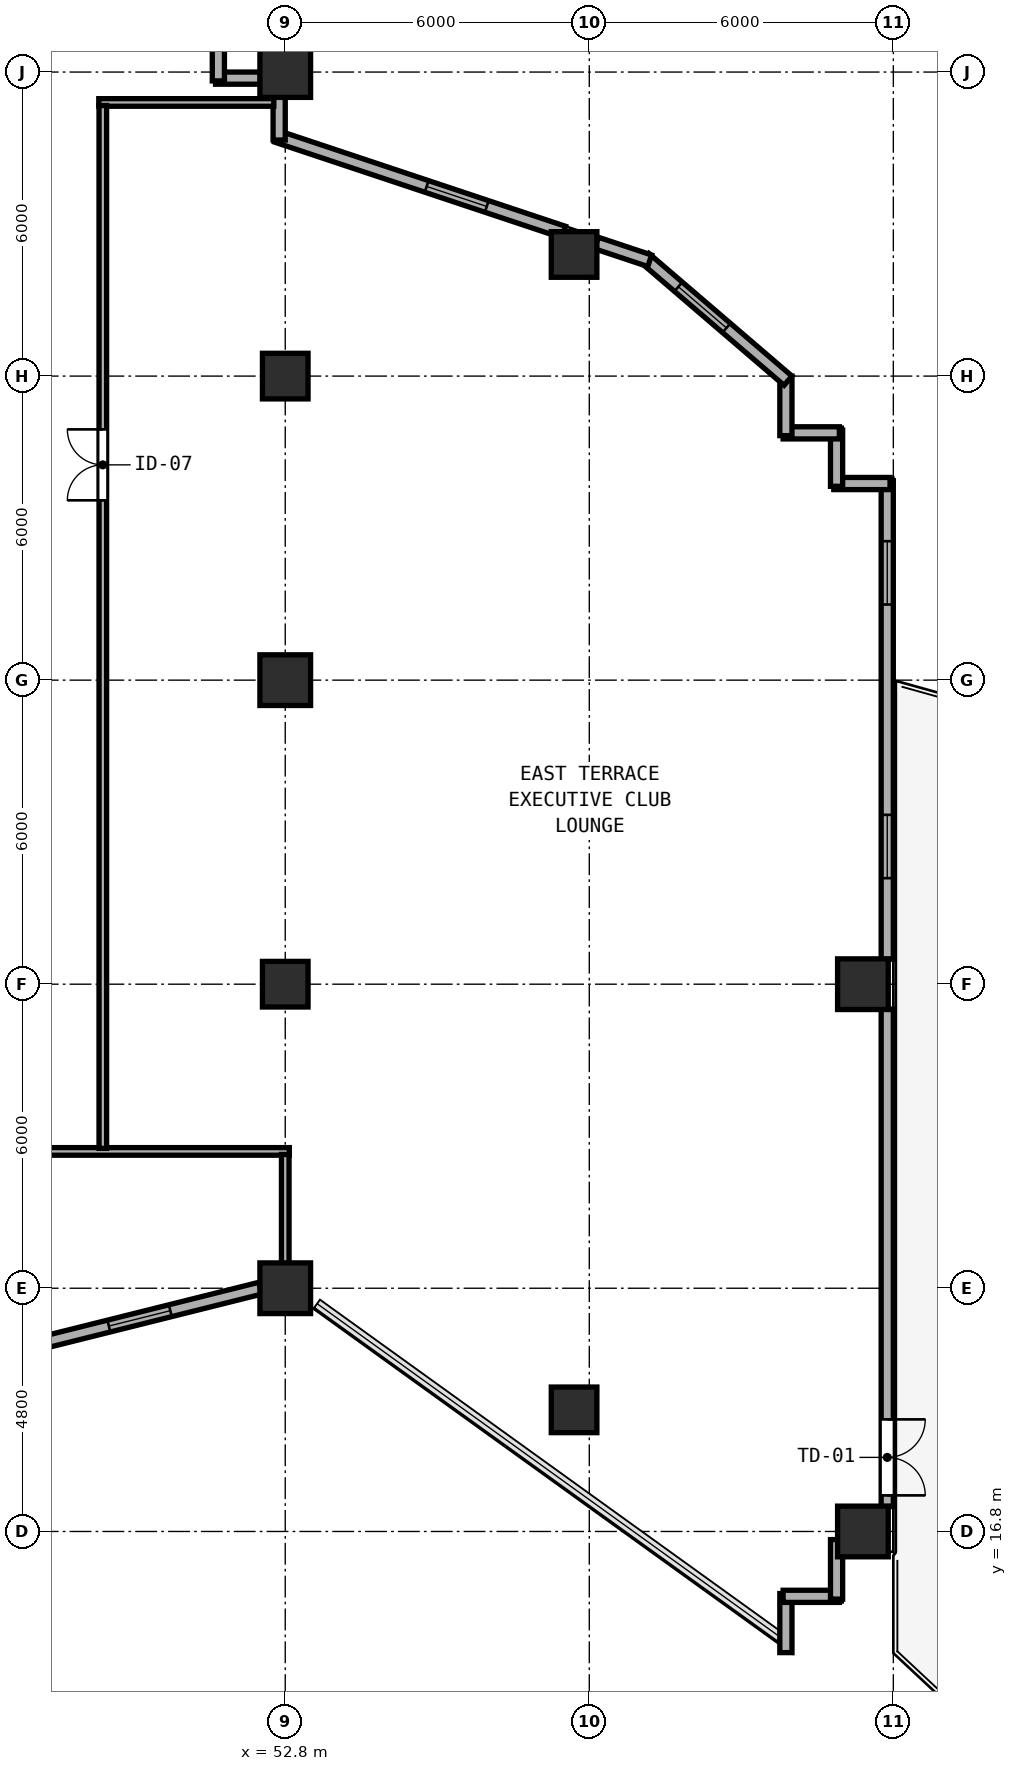
"""IFC4 building model, lengths in metres.
Left out: names, types, materials, properties, quantities, classifications, styles, units other than length and angle.
Written with IfcOpenShell. Run it as: python <this file> out.ifc"""

import sys

from ifc_helpers import new_model, si_unit, direction, frame, frame_2d, origin, origin_2d, place, context, subcontext, project, spatial, rectangle, hollow_rectangle, extrude, element, fill, save


model = new_model("IFC4")
c1 = context("Model", 3, precision=1e-05, world=origin(), true_north=direction((0.0, 1.0)))
c2 = subcontext(c1, "Body", "Model", "MODEL_VIEW")
j1 = project(units=[si_unit("LENGTHUNIT", "METRE"), si_unit("PLANEANGLEUNIT", "RADIAN")], contexts=[c1])
p1 = place(None, origin())
s1 = spatial("IfcSite", under=j1, at=p1, CompositionType="ELEMENT")
p2 = place(p1, origin())
s2 = spatial("IfcBuilding", under=s1, at=p2, CompositionType="ELEMENT")
p3 = place(p2, frame((0.0, 0.0, 94.0)))
s3 = spatial("IfcBuildingStorey", under=s2, at=p3, CompositionType="ELEMENT", Elevation=94.0)
for number, where, z_axis, x_axis in (
    (1, (52.8, 21.6, 0.0), (0.0, 0.0, 1.0), (1.0, 0.0, 0.0)),
    (2, (52.8, 33.6, 0.0), (0.0, 0.0, 1.0), (1.0, 0.0, 0.0)),
    (3, (52.8, 45.6, 0.0), (0.0, 0.0, 1.0), (1.0, 0.0, 0.0)),
    (4, (64.2, 16.8, 0.0), (0.0, 0.0, 1.0), (1.0, 0.0, 0.0)),
    (5, (64.2, 27.6, 0.0), (0.0, 0.0, 1.0), (1.0, 0.0, 0.0)),
):
    element("IfcColumn", number, at=place(p3, frame(where, z_axis=z_axis, x_axis=x_axis)), inside=s3, PredefinedType="COLUMN", context=c2, shape_type="SweptSolid", body=[
        extrude(hollow_rectangle(XDim=1.0, YDim=1.0, WallThickness=0.038, at=origin_2d()), origin(), (0.0, 0.0, 1.0), 4.4),
    ])
for number, where, z_axis, x_axis in (
    (6, (52.8, 27.6, 0.0), (0.0, 0.0, 1.0), (1.0, 0.0, 0.0)),
    (7, (52.8, 39.6, 0.0), (0.0, 0.0, 1.0), (1.0, 0.0, 0.0)),
    (8, (58.5, 19.2, 0.0), (0.0, 0.0, 1.0), (1.0, 0.0, 0.0)),
    (9, (58.5, 42.0, 0.0), (0.0, 0.0, 1.0), (1.0, 0.0, 0.0)),
):
    element("IfcColumn", number, at=place(p3, frame(where, z_axis=z_axis, x_axis=x_axis)), inside=s3, PredefinedType="COLUMN", context=c2, shape_type="SweptSolid", body=[
        extrude(hollow_rectangle(XDim=0.9, YDim=0.9, WallThickness=0.034, at=origin_2d()), origin(), (0.0, 0.0, 1.0), 4.4),
    ])
p4 = place(p3, frame((47.767, 20.465, 0.0), z_axis=(0.0, 0.0, 1.0), x_axis=(0.970145568042, 0.242523353121, 0.0)))
e10 = element("IfcWall", 10, at=p4, inside=s3, PredefinedType="SOLIDWALL", context=c2, shape_type="SweptSolid", body=[
    extrude(rectangle(XDim=4.681, YDim=0.24, at=frame_2d((2.34, 0.0))), origin(), (0.0, 0.0, 1.0), 3.745),
])
p5 = place(p4, frame((1.6, 0.0, 0.85)))
e11 = element("IfcOpeningElement", 11, at=p5, cuts=e10, PredefinedType="OPENING", context=c2, shape_type="SweptSolid", body=[
    extrude(rectangle(XDim=1.25, YDim=1.95, at=frame_2d((0.625, 0.975))), frame((0.0, 0.13, 0.0), z_axis=(0.0, -1.0, 0.0), x_axis=(1.0, 0.0, 0.0)), (0.0, 0.0, 1.0), 0.26),
])
p6 = place(p3, frame((62.68, 14.409, 0.0), z_axis=(0.0, 0.0, 1.0), x_axis=(0.0, 1.0, 0.0)))
e12 = element("IfcWall", 12, at=p6, inside=s3, PredefinedType="SOLIDWALL", context=c2, shape_type="SweptSolid", body=[
    extrude(rectangle(XDim=1.166, YDim=0.24, at=frame_2d((0.583, 0.0))), origin(), (0.0, 0.0, 1.0), 4.2),
])
p7 = place(p3, frame((62.625, 15.52, 0.0), z_axis=(0.0, 0.0, 1.0), x_axis=(1.0, 0.0, 0.0)))
e13 = element("IfcWall", 13, at=p7, inside=s3, PredefinedType="SOLIDWALL", context=c2, shape_type="SweptSolid", body=[
    extrude(rectangle(XDim=1.11, YDim=0.24, at=frame_2d((0.555, 0.0))), origin(), (0.0, 0.0, 1.0), 4.2),
])
p8 = place(p3, frame((63.68, 15.465, 0.0), z_axis=(0.0, 0.0, 1.0), x_axis=(0.0, 1.0, 0.0)))
e14 = element("IfcWall", 14, at=p8, inside=s3, PredefinedType="SOLIDWALL", context=c2, shape_type="SweptSolid", body=[
    extrude(rectangle(XDim=1.175, YDim=0.24, at=frame_2d((0.587, 0.0))), origin(), (0.0, 0.0, 1.0), 4.2),
])
p9 = place(p3, frame((64.68, 17.292, 0.0), z_axis=(0.0, 0.0, 1.0), x_axis=(0.0, 1.0, 0.0)))
e15 = element("IfcWall", 15, at=p9, inside=s3, PredefinedType="SOLIDWALL", context=c2, shape_type="SweptSolid", body=[
    extrude(rectangle(XDim=9.816, YDim=0.24, at=frame_2d((4.908, 0.0))), origin(), (0.0, 0.0, 1.0), 4.2),
])
p10 = place(p9, frame((1.72, 0.0, 0.0), z_axis=(0.0, 0.0, 1.0), x_axis=(-1.0, 0.0, 0.0)))
e16 = element("IfcOpeningElement", 16, at=p10, cuts=e15, PredefinedType="OPENING", context=c2, shape_type="SweptSolid", body=[
    extrude(rectangle(XDim=1.5, YDim=2.2, at=frame_2d((0.75, 1.1))), frame((0.0, 0.13, 0.0), z_axis=(0.0, -1.0, 0.0), x_axis=(1.0, 0.0, 0.0)), (0.0, 0.0, 1.0), 0.26),
])
p11 = place(p3, frame((64.68, 28.092, 0.0), z_axis=(0.0, 0.0, 1.0), x_axis=(0.0, 1.0, 0.0)))
e17 = element("IfcWall", 17, at=p11, inside=s3, PredefinedType="SOLIDWALL", context=c2, shape_type="SweptSolid", body=[
    extrude(rectangle(XDim=9.443, YDim=0.24, at=frame_2d((4.721, 0.0))), origin(), (0.0, 0.0, 1.0), 4.2),
])
p12 = place(p11, frame((1.6, 0.0, 0.85)))
e18 = element("IfcOpeningElement", 18, at=p12, cuts=e17, PredefinedType="OPENING", context=c2, shape_type="SweptSolid", body=[
    extrude(rectangle(XDim=1.25, YDim=1.95, at=frame_2d((0.625, 0.975))), frame((0.0, 0.13, 0.0), z_axis=(0.0, -1.0, 0.0), x_axis=(1.0, 0.0, 0.0)), (0.0, 0.0, 1.0), 0.26),
])
p13 = place(p11, frame((7.0, 0.0, 0.85)))
e19 = element("IfcOpeningElement", 19, at=p13, cuts=e17, PredefinedType="OPENING", context=c2, shape_type="SweptSolid", body=[
    extrude(rectangle(XDim=1.25, YDim=1.95, at=frame_2d((0.625, 0.975))), frame((0.0, 0.13, 0.0), z_axis=(0.0, -1.0, 0.0), x_axis=(1.0, 0.0, 0.0)), (0.0, 0.0, 1.0), 0.26),
])
p14 = place(p3, frame((64.735, 37.48, 0.0), z_axis=(0.0, 0.0, 1.0), x_axis=(-1.0, 0.0, 0.0)))
e20 = element("IfcWall", 20, at=p14, inside=s3, PredefinedType="SOLIDWALL", context=c2, shape_type="SweptSolid", body=[
    extrude(rectangle(XDim=1.11, YDim=0.24, at=frame_2d((0.555, 0.0))), origin(), (0.0, 0.0, 1.0), 4.2),
])
p15 = place(p3, frame((63.68, 37.425, 0.0), z_axis=(0.0, 0.0, 1.0), x_axis=(0.0, 1.0, 0.0)))
e21 = element("IfcWall", 21, at=p15, inside=s3, PredefinedType="SOLIDWALL", context=c2, shape_type="SweptSolid", body=[
    extrude(rectangle(XDim=1.11, YDim=0.24, at=frame_2d((0.555, 0.0))), origin(), (0.0, 0.0, 1.0), 4.2),
])
p16 = place(p3, frame((63.735, 38.48, 0.0), z_axis=(0.0, 0.0, 1.0), x_axis=(-1.0, 0.0, 0.0)))
e22 = element("IfcWall", 22, at=p16, inside=s3, PredefinedType="SOLIDWALL", context=c2, shape_type="SweptSolid", body=[
    extrude(rectangle(XDim=1.11, YDim=0.24, at=frame_2d((0.555, 0.0))), origin(), (0.0, 0.0, 1.0), 4.2),
])
p17 = place(p3, frame((62.68, 38.425, 0.0), z_axis=(0.0, 0.0, 1.0), x_axis=(0.0, 1.0, 0.0)))
e23 = element("IfcWall", 23, at=p17, inside=s3, PredefinedType="SOLIDWALL", context=c2, shape_type="SweptSolid", body=[
    extrude(rectangle(XDim=1.175, YDim=0.24, at=frame_2d((0.587, 0.0))), origin(), (0.0, 0.0, 1.0), 4.2),
])
p18 = place(p3, frame((62.722, 39.509, 0.0), z_axis=(0.0, 0.0, 1.0), x_axis=(-0.759247334792, 0.650802185469, 0.0)))
e24 = element("IfcWall", 24, at=p18, inside=s3, PredefinedType="SOLIDWALL", context=c2, shape_type="SweptSolid", body=[
    extrude(rectangle(XDim=3.719, YDim=0.24, at=frame_2d((1.86, 0.0))), origin(), (0.0, 0.0, 1.0), 4.2),
])
p19 = place(p18, frame((1.6, 0.0, 0.85)))
e25 = element("IfcOpeningElement", 25, at=p19, cuts=e24, PredefinedType="OPENING", context=c2, shape_type="SweptSolid", body=[
    extrude(rectangle(XDim=1.25, YDim=1.95, at=frame_2d((0.625, 0.975))), frame((0.0, 0.13, 0.0), z_axis=(0.0, -1.0, 0.0), x_axis=(1.0, 0.0, 0.0)), (0.0, 0.0, 1.0), 0.26),
])
p20 = place(p3, frame((59.992, 41.876, 0.0), z_axis=(0.0, 0.0, 1.0), x_axis=(-0.948661238983, 0.316293935527, 0.0)))
e26 = element("IfcWall", 26, at=p20, inside=s3, PredefinedType="SOLIDWALL", context=c2, shape_type="SweptSolid", body=[
    extrude(rectangle(XDim=1.107, YDim=0.24, at=frame_2d((0.553, 0.0))), origin(), (0.0, 0.0, 1.0), 4.2),
])
p21 = place(p3, frame((58.295, 42.442, 0.0), z_axis=(0.0, 0.0, 1.0), x_axis=(-0.948687385027, 0.316215504823, 0.0)))
e27 = element("IfcWall", 27, at=p21, inside=s3, PredefinedType="SOLIDWALL", context=c2, shape_type="SweptSolid", body=[
    extrude(rectangle(XDim=5.973, YDim=0.24, at=frame_2d((2.987, 0.0))), origin(), (0.0, 0.0, 1.0), 3.745),
])
p22 = place(p21, frame((1.6, 0.0, 0.85)))
e28 = element("IfcOpeningElement", 28, at=p22, cuts=e27, PredefinedType="OPENING", context=c2, shape_type="SweptSolid", body=[
    extrude(rectangle(XDim=1.25, YDim=1.95, at=frame_2d((0.625, 0.975))), frame((0.0, 0.13, 0.0), z_axis=(0.0, -1.0, 0.0), x_axis=(1.0, 0.0, 0.0)), (0.0, 0.0, 1.0), 0.26),
])
p23 = place(p3, frame((52.68, 44.259, 0.0), z_axis=(0.0, 0.0, 1.0), x_axis=(0.0, 1.0, 0.0)))
e29 = element("IfcWall", 29, at=p23, inside=s3, PredefinedType="SOLIDWALL", context=c2, shape_type="SweptSolid", body=[
    extrude(rectangle(XDim=0.849, YDim=0.24, at=frame_2d((0.425, 0.0))), origin(), (0.0, 0.0, 1.0), 3.745),
])
p24 = place(p3, frame((52.308, 45.48, 0.0), z_axis=(0.0, 0.0, 1.0), x_axis=(-1.0, 0.0, 0.0)))
e30 = element("IfcWall", 30, at=p24, inside=s3, PredefinedType="SOLIDWALL", context=c2, shape_type="SweptSolid", body=[
    extrude(rectangle(XDim=0.883, YDim=0.24, at=frame_2d((0.441, 0.0))), origin(), (0.0, 0.0, 1.0), 4.2),
])
p25 = place(p3, frame((51.48, 45.425, 0.0), z_axis=(0.0, 0.0, 1.0), x_axis=(0.0, 1.0, 0.0)))
e31 = element("IfcWall", 31, at=p25, inside=s3, PredefinedType="SOLIDWALL", context=c2, shape_type="SweptSolid", body=[
    extrude(rectangle(XDim=1.31, YDim=0.24, at=frame_2d((0.655, 0.0))), origin(), (0.0, 0.0, 1.0), 4.2),
])
p26 = place(p3, frame((23.92, 24.3, 0.0), z_axis=(0.0, 0.0, 1.0), x_axis=(1.0, 0.0, 0.0)))
e32 = element("IfcWall", 32, at=p26, inside=s3, PredefinedType="PARTITIONING", context=c2, shape_type="SweptSolid", body=[
    extrude(rectangle(XDim=28.96, YDim=0.15, at=frame_2d((14.48, 0.0))), origin(), (0.0, 0.0, 1.0), 4.2),
])
p27 = place(p26, frame((7.9, 0.0, 0.0), z_axis=(0.0, 0.0, 1.0), x_axis=(-1.0, 0.0, 0.0)))
e33 = element("IfcOpeningElement", 33, at=p27, cuts=e32, PredefinedType="OPENING", context=c2, shape_type="SweptSolid", body=[
    extrude(rectangle(XDim=1.4, YDim=2.18, at=frame_2d((0.7, 1.09))), frame((0.0, 0.085, 0.0), z_axis=(0.0, -1.0, 0.0), x_axis=(1.0, 0.0, 0.0)), (0.0, 0.0, 1.0), 0.17),
])
p28 = place(p3, frame((52.8, 21.819, 0.0), z_axis=(0.0, 0.0, 1.0), x_axis=(0.0, 1.0, 0.0)))
e34 = element("IfcWall", 34, at=p28, inside=s3, PredefinedType="PARTITIONING", context=c2, shape_type="SweptSolid", body=[
    extrude(rectangle(XDim=2.421, YDim=0.15, at=frame_2d((1.211, 0.0))), origin(), (0.0, 0.0, 1.0), 3.745),
])
p29 = place(p3, frame((49.12, 45.0, 0.0), z_axis=(0.0, 0.0, 1.0), x_axis=(1.0, 0.0, 0.0)))
e35 = element("IfcWall", 35, at=p29, inside=s3, PredefinedType="PARTITIONING", context=c2, shape_type="SweptSolid", body=[
    extrude(rectangle(XDim=3.455, YDim=0.15, at=frame_2d((1.728, 0.0))), origin(), (0.0, 0.0, 1.0), 4.2),
])
p30 = place(p3, frame((49.2, 24.36, 0.0), z_axis=(0.0, 0.0, 1.0), x_axis=(0.0, 1.0, 0.0)))
e36 = element("IfcWall", 36, at=p30, inside=s3, PredefinedType="PARTITIONING", context=c2, shape_type="SweptSolid", body=[
    extrude(rectangle(XDim=20.58, YDim=0.15, at=frame_2d((10.29, 0.0))), origin(), (0.0, 0.0, 1.0), 4.2),
])
p31 = place(p30, frame((12.789, 0.0, 0.0)))
e37 = element("IfcOpeningElement", 37, at=p31, cuts=e36, PredefinedType="OPENING", context=c2, shape_type="SweptSolid", body=[
    extrude(rectangle(XDim=1.4, YDim=2.18, at=frame_2d((0.7, 1.09))), frame((0.0, 0.085, 0.0), z_axis=(0.0, -1.0, 0.0), x_axis=(1.0, 0.0, 0.0)), (0.0, 0.0, 1.0), 0.17),
])
p32 = place(p5, origin())
e38 = element("IfcWindow", 38, at=p32, inside=s3, PartitioningType="SINGLE_PANEL", PredefinedType="WINDOW", context=c2, shape_type="SweptSolid", body=[
    extrude(rectangle(XDim=1.25, YDim=1.95, at=frame_2d((0.625, 0.975))), frame((0.0, 0.03, 0.0), z_axis=(0.0, -1.0, 0.0), x_axis=(1.0, 0.0, 0.0)), (0.0, 0.0, 1.0), 0.06),
])
fill(e11, e38)
p33 = place(p12, origin())
e39 = element("IfcWindow", 39, at=p33, inside=s3, PartitioningType="SINGLE_PANEL", PredefinedType="WINDOW", context=c2, shape_type="SweptSolid", body=[
    extrude(rectangle(XDim=1.25, YDim=1.95, at=frame_2d((0.625, 0.975))), frame((0.0, 0.03, 0.0), z_axis=(0.0, -1.0, 0.0), x_axis=(1.0, 0.0, 0.0)), (0.0, 0.0, 1.0), 0.06),
])
fill(e18, e39)
p34 = place(p13, origin())
e40 = element("IfcWindow", 40, at=p34, inside=s3, PartitioningType="SINGLE_PANEL", PredefinedType="WINDOW", context=c2, shape_type="SweptSolid", body=[
    extrude(rectangle(XDim=1.25, YDim=1.95, at=frame_2d((0.625, 0.975))), frame((0.0, 0.03, 0.0), z_axis=(0.0, -1.0, 0.0), x_axis=(1.0, 0.0, 0.0)), (0.0, 0.0, 1.0), 0.06),
])
fill(e19, e40)
p35 = place(p19, origin())
e41 = element("IfcWindow", 41, at=p35, inside=s3, PartitioningType="SINGLE_PANEL", PredefinedType="WINDOW", context=c2, shape_type="SweptSolid", body=[
    extrude(rectangle(XDim=1.25, YDim=1.95, at=frame_2d((0.625, 0.975))), frame((0.0, 0.03, 0.0), z_axis=(0.0, -1.0, 0.0), x_axis=(1.0, 0.0, 0.0)), (0.0, 0.0, 1.0), 0.06),
])
fill(e25, e41)
p36 = place(p22, origin())
e42 = element("IfcWindow", 42, at=p36, inside=s3, PartitioningType="SINGLE_PANEL", PredefinedType="WINDOW", context=c2, shape_type="SweptSolid", body=[
    extrude(rectangle(XDim=1.25, YDim=1.95, at=frame_2d((0.625, 0.975))), frame((0.0, 0.03, 0.0), z_axis=(0.0, -1.0, 0.0), x_axis=(1.0, 0.0, 0.0)), (0.0, 0.0, 1.0), 0.06),
])
fill(e28, e42)
p37 = place(p10, origin())
e43 = element("IfcDoor", 43, at=p37, inside=s3, OperationType="DOUBLE_DOOR_SINGLE_SWING", PredefinedType="DOOR", context=c2, shape_type="SweptSolid", body=[
    extrude(rectangle(XDim=1.5, YDim=2.2, at=frame_2d((0.75, 1.1))), frame((0.0, 0.025, 0.0), z_axis=(0.0, -1.0, 0.0), x_axis=(1.0, 0.0, 0.0)), (0.0, 0.0, 1.0), 0.05),
])
fill(e16, e43)
p38 = place(p31, origin())
e44 = element("IfcDoor", 44, at=p38, inside=s3, OperationType="DOUBLE_DOOR_SINGLE_SWING", PredefinedType="DOOR", context=c2, shape_type="SweptSolid", body=[
    extrude(rectangle(XDim=1.4, YDim=2.18, at=frame_2d((0.7, 1.09))), frame((0.0, 0.025, 0.0), z_axis=(0.0, -1.0, 0.0), x_axis=(1.0, 0.0, 0.0)), (0.0, 0.0, 1.0), 0.05),
])
fill(e37, e44)
save(model, sys.argv[1])
